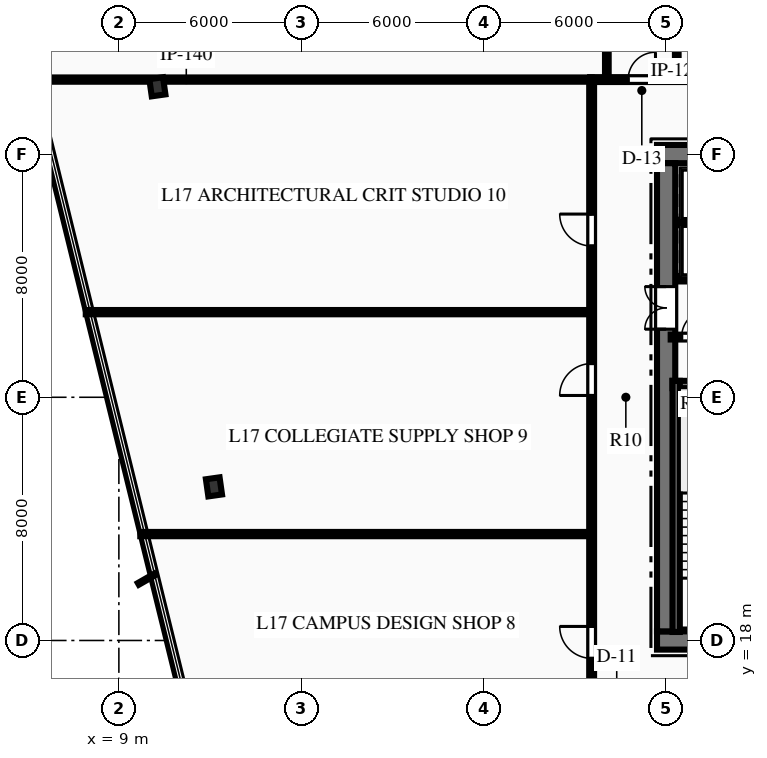
"""IFC4 building model, lengths in metres.
Left out: names, types, materials, properties, quantities, classifications, styles, units other than length and angle.
Written with IfcOpenShell. Run it as: python <this file> out.ifc"""

import sys

from ifc_helpers import new_model, si_unit, direction, frame, frame_2d, origin, origin_2d, place, context, subcontext, project, spatial, rectangle, i_section, extrude, element, fill, save


model = new_model("IFC4")
c1 = context("Model", 3, precision=1e-05, world=origin(), true_north=direction((0.0, 1.0)))
c2 = subcontext(c1, "Body", "Model", "MODEL_VIEW")
j1 = project(units=[si_unit("LENGTHUNIT", "METRE"), si_unit("PLANEANGLEUNIT", "RADIAN")], contexts=[c1])
p1 = place(None, origin())
s1 = spatial("IfcSite", under=j1, at=p1, CompositionType="ELEMENT")
p2 = place(p1, origin())
s2 = spatial("IfcBuilding", under=s1, at=p2, CompositionType="ELEMENT")
p3 = place(p2, frame((0.0, 0.0, 73.95)))
s3 = spatial("IfcBuildingStorey", under=s2, at=p3, CompositionType="ELEMENT", Elevation=73.95)
p4 = place(p3, frame((26.7, 18.0, 0.0), z_axis=(0.0, 0.0, 1.0), x_axis=(1.0, 0.0, 0.0)))
e1 = element("IfcWall", 1, at=p4, inside=s3, PredefinedType="SHEAR", context=c2, shape_type="SweptSolid", body=[
    extrude(rectangle(XDim=18.6, YDim=0.6, at=frame_2d((9.3, 0.0))), origin(), (0.0, 0.0, 1.0), 3.75),
])
p5 = place(p4, frame((7.4, 0.0, 0.0)))
e2 = element("IfcOpeningElement", 2, at=p5, cuts=e1, PredefinedType="OPENING", context=c2, shape_type="SweptSolid", body=[
    extrude(rectangle(XDim=1.1, YDim=2.15, at=frame_2d((0.55, 1.075))), frame((0.0, 0.31, 0.0), z_axis=(0.0, -1.0, 0.0), x_axis=(1.0, 0.0, 0.0)), (0.0, 0.0, 1.0), 0.62),
])
p6 = place(p4, frame((10.1, 0.0, 0.0)))
e3 = element("IfcOpeningElement", 3, at=p6, cuts=e1, PredefinedType="OPENING", context=c2, shape_type="SweptSolid", body=[
    extrude(rectangle(XDim=1.1, YDim=2.15, at=frame_2d((0.55, 1.075))), frame((0.0, 0.31, 0.0), z_axis=(0.0, -1.0, 0.0), x_axis=(1.0, 0.0, 0.0)), (0.0, 0.0, 1.0), 0.62),
])
p7 = place(p3, frame((26.7, 34.0, 0.0), z_axis=(0.0, 0.0, 1.0), x_axis=(1.0, 0.0, 0.0)))
e4 = element("IfcWall", 4, at=p7, inside=s3, PredefinedType="SHEAR", context=c2, shape_type="SweptSolid", body=[
    extrude(rectangle(XDim=18.6, YDim=0.6, at=frame_2d((9.3, 0.0))), origin(), (0.0, 0.0, 1.0), 3.75),
])
p8 = place(p7, frame((1.265, 0.0, 0.0)))
e5 = element("IfcOpeningElement", 5, at=p8, cuts=e4, PredefinedType="OPENING", context=c2, shape_type="SweptSolid", body=[
    extrude(rectangle(XDim=1.1, YDim=2.15, at=frame_2d((0.55, 1.075))), frame((0.0, 0.31, 0.0), z_axis=(0.0, -1.0, 0.0), x_axis=(1.0, 0.0, 0.0)), (0.0, 0.0, 1.0), 0.62),
])
p9 = place(p7, frame((3.515, 0.0, 0.0)))
e6 = element("IfcOpeningElement", 6, at=p9, cuts=e4, PredefinedType="OPENING", context=c2, shape_type="SweptSolid", body=[
    extrude(rectangle(XDim=1.1, YDim=2.15, at=frame_2d((0.55, 1.075))), frame((0.0, 0.31, 0.0), z_axis=(0.0, -1.0, 0.0), x_axis=(1.0, 0.0, 0.0)), (0.0, 0.0, 1.0), 0.62),
])
p10 = place(p7, frame((13.985, 0.0, 0.0)))
e7 = element("IfcOpeningElement", 7, at=p10, cuts=e4, PredefinedType="OPENING", context=c2, shape_type="SweptSolid", body=[
    extrude(rectangle(XDim=1.1, YDim=2.15, at=frame_2d((0.55, 1.075))), frame((0.0, 0.31, 0.0), z_axis=(0.0, -1.0, 0.0), x_axis=(1.0, 0.0, 0.0)), (0.0, 0.0, 1.0), 0.62),
])
p11 = place(p7, frame((16.235, 0.0, 0.0)))
e8 = element("IfcOpeningElement", 8, at=p11, cuts=e4, PredefinedType="OPENING", context=c2, shape_type="SweptSolid", body=[
    extrude(rectangle(XDim=1.1, YDim=2.15, at=frame_2d((0.55, 1.075))), frame((0.0, 0.31, 0.0), z_axis=(0.0, -1.0, 0.0), x_axis=(1.0, 0.0, 0.0)), (0.0, 0.0, 1.0), 0.62),
])
p12 = place(p3, frame((27.0, 18.3, 0.0), z_axis=(0.0, 0.0, 1.0), x_axis=(0.0, 1.0, 0.0)))
e9 = element("IfcWall", 9, at=p12, inside=s3, PredefinedType="SHEAR", context=c2, shape_type="SweptSolid", body=[
    extrude(rectangle(XDim=15.4, YDim=0.6, at=frame_2d((7.7, 0.0))), origin(), (0.0, 0.0, 1.0), 3.75),
])
p13 = place(p12, frame((9.94, 0.0, 0.0)))
e10 = element("IfcOpeningElement", 10, at=p13, cuts=e9, PredefinedType="OPENING", context=c2, shape_type="SweptSolid", body=[
    extrude(rectangle(XDim=1.4, YDim=2.2, at=frame_2d((0.7, 1.1))), frame((0.0, 0.31, 0.0), z_axis=(0.0, -1.0, 0.0), x_axis=(1.0, 0.0, 0.0)), (0.0, 0.0, 1.0), 0.62),
])
p14 = place(p3, frame((27.21, 26.42, 0.0), z_axis=(0.0, 0.0, 1.0), x_axis=(1.0, 0.0, 0.0)))
e11 = element("IfcWall", 11, at=p14, inside=s3, PredefinedType="SHEAR", context=c2, shape_type="SweptSolid", body=[
    extrude(rectangle(XDim=3.98, YDim=0.24, at=frame_2d((1.99, 0.0))), origin(), (0.0, 0.0, 1.0), 3.75),
])
p15 = place(p3, frame((27.33, 18.28, 0.0), z_axis=(0.0, 0.0, 1.0), x_axis=(0.0, 1.0, 0.0)))
e12 = element("IfcWall", 12, at=p15, inside=s3, PredefinedType="SHEAR", context=c2, shape_type="SweptSolid", body=[
    extrude(rectangle(XDim=8.26, YDim=0.24, at=frame_2d((4.13, 0.0))), origin(), (0.0, 0.0, 1.0), 3.75),
])
for number, where, z_axis, x_axis in (
    (13, (10.266, 36.213, 0.0), (0.0, 0.0, 1.0), (0.99, 0.14, 0.0)),
    (14, (12.127, 23.053, 0.0), (0.0, 0.0, 1.0), (0.99, 0.14, 0.0)),
):
    element("IfcColumn", number, at=place(p3, frame(where, z_axis=z_axis, x_axis=x_axis)), inside=s3, PredefinedType="COLUMN", context=c2, shape_type="SweptSolid", body=[
        extrude(i_section(OverallWidth=0.454, OverallDepth=0.569, WebThickness=0.078, FlangeThickness=0.125, at=origin_2d()), origin(), (0.0, 0.0, 1.0), 3.75),
    ])
p16 = place(p3, frame((27.15, 27.98, 0.0), z_axis=(0.0, 0.0, 1.0), x_axis=(1.0, 0.0, 0.0)))
e15 = element("IfcWall", 15, at=p16, inside=s3, PredefinedType="PARTITIONING", context=c2, shape_type="SweptSolid", body=[
    extrude(rectangle(XDim=4.05, YDim=0.16, at=frame_2d((2.025, 0.0))), origin(), (0.0, 0.0, 1.0), 3.44),
])
p17 = place(p16, frame((0.36, 0.0, 0.0)))
e16 = element("IfcOpeningElement", 16, at=p17, cuts=e15, PredefinedType="OPENING", context=c2, shape_type="SweptSolid", body=[
    extrude(rectangle(XDim=0.9, YDim=2.15, at=frame_2d((0.45, 1.075))), frame((0.0, 0.09, 0.0), z_axis=(0.0, -1.0, 0.0), x_axis=(1.0, 0.0, 0.0)), (0.0, 0.0, 1.0), 0.18),
])
p18 = place(p16, frame((1.63, 0.0, 0.0)))
e17 = element("IfcOpeningElement", 17, at=p18, cuts=e15, PredefinedType="OPENING", context=c2, shape_type="SweptSolid", body=[
    extrude(rectangle(XDim=0.9, YDim=2.15, at=frame_2d((0.45, 1.075))), frame((0.0, 0.09, 0.0), z_axis=(0.0, -1.0, 0.0), x_axis=(1.0, 0.0, 0.0)), (0.0, 0.0, 1.0), 0.18),
])
p19 = place(p16, frame((2.788, 0.0, 0.0)))
e18 = element("IfcOpeningElement", 18, at=p19, cuts=e15, PredefinedType="OPENING", context=c2, shape_type="SweptSolid", body=[
    extrude(rectangle(XDim=0.9, YDim=2.15, at=frame_2d((0.45, 1.075))), frame((0.0, 0.09, 0.0), z_axis=(0.0, -1.0, 0.0), x_axis=(1.0, 0.0, 0.0)), (0.0, 0.0, 1.0), 0.18),
])
p20 = place(p3, frame((27.45, 29.9, 0.0), z_axis=(0.0, 0.0, 1.0), x_axis=(1.0, 0.0, 0.0)))
e19 = element("IfcWall", 19, at=p20, inside=s3, PredefinedType="PARTITIONING", context=c2, shape_type="SweptSolid", body=[
    extrude(rectangle(XDim=4.43, YDim=0.18, at=frame_2d((2.215, 0.0))), origin(), (0.0, 0.0, 1.0), 3.44),
])
p21 = place(p20, frame((0.515, 0.0, 0.0)))
e20 = element("IfcOpeningElement", 20, at=p21, cuts=e19, PredefinedType="OPENING", context=c2, shape_type="SweptSolid", body=[
    extrude(rectangle(XDim=1.1, YDim=2.15, at=frame_2d((0.55, 1.075))), frame((0.0, 0.1, 0.0), z_axis=(0.0, -1.0, 0.0), x_axis=(1.0, 0.0, 0.0)), (0.0, 0.0, 1.0), 0.2),
])
p22 = place(p20, frame((2.765, 0.0, 0.0)))
e21 = element("IfcOpeningElement", 21, at=p22, cuts=e19, PredefinedType="OPENING", context=c2, shape_type="SweptSolid", body=[
    extrude(rectangle(XDim=1.1, YDim=2.15, at=frame_2d((0.55, 1.075))), frame((0.0, 0.1, 0.0), z_axis=(0.0, -1.0, 0.0), x_axis=(1.0, 0.0, 0.0)), (0.0, 0.0, 1.0), 0.2),
])
p23 = place(p3, frame((27.45, 31.75, 0.0), z_axis=(0.0, 0.0, 1.0), x_axis=(1.0, 0.0, 0.0)))
e22 = element("IfcWall", 22, at=p23, inside=s3, PredefinedType="PARTITIONING", context=c2, shape_type="SweptSolid", body=[
    extrude(rectangle(XDim=4.43, YDim=0.18, at=frame_2d((2.215, 0.0))), origin(), (0.0, 0.0, 1.0), 3.44),
])
p24 = place(p3, frame((24.5, 36.45, 0.0), z_axis=(0.0, 0.0, 1.0), x_axis=(1.0, 0.0, 0.0)))
e23 = element("IfcWall", 23, at=p24, inside=s3, PredefinedType="PARTITIONING", context=c2, shape_type="SweptSolid", body=[
    extrude(rectangle(XDim=23.0, YDim=0.16, at=frame_2d((11.5, 0.0))), origin(), (0.0, 0.0, 1.0), 3.44),
])
p25 = place(p24, frame((1.25, 0.0, 0.0)))
e24 = element("IfcOpeningElement", 24, at=p25, cuts=e23, PredefinedType="OPENING", context=c2, shape_type="SweptSolid", body=[
    extrude(rectangle(XDim=0.9, YDim=2.15, at=frame_2d((0.45, 1.075))), frame((0.0, 0.09, 0.0), z_axis=(0.0, -1.0, 0.0), x_axis=(1.0, 0.0, 0.0)), (0.0, 0.0, 1.0), 0.18),
])
p26 = place(p24, frame((3.55, 0.0, 0.0)))
e25 = element("IfcOpeningElement", 25, at=p26, cuts=e23, PredefinedType="OPENING", context=c2, shape_type="SweptSolid", body=[
    extrude(rectangle(XDim=0.9, YDim=2.15, at=frame_2d((0.45, 1.075))), frame((0.0, 0.09, 0.0), z_axis=(0.0, -1.0, 0.0), x_axis=(1.0, 0.0, 0.0)), (0.0, 0.0, 1.0), 0.18),
])
p27 = place(p24, frame((5.8, 0.0, 0.0)))
e26 = element("IfcOpeningElement", 26, at=p27, cuts=e23, PredefinedType="OPENING", context=c2, shape_type="SweptSolid", body=[
    extrude(rectangle(XDim=1.0, YDim=2.15, at=frame_2d((0.5, 1.075))), frame((0.0, 0.09, 0.0), z_axis=(0.0, -1.0, 0.0), x_axis=(1.0, 0.0, 0.0)), (0.0, 0.0, 1.0), 0.18),
])
p28 = place(p24, frame((9.465, 0.0, 0.0)))
e27 = element("IfcOpeningElement", 27, at=p28, cuts=e23, PredefinedType="OPENING", context=c2, shape_type="SweptSolid", body=[
    extrude(rectangle(XDim=1.05, YDim=2.15, at=frame_2d((0.525, 1.075))), frame((0.0, 0.09, 0.0), z_axis=(0.0, -1.0, 0.0), x_axis=(1.0, 0.0, 0.0)), (0.0, 0.0, 1.0), 0.18),
])
p29 = place(p24, frame((16.755, 0.0, 0.0)))
e28 = element("IfcOpeningElement", 28, at=p29, cuts=e23, PredefinedType="OPENING", context=c2, shape_type="SweptSolid", body=[
    extrude(rectangle(XDim=1.05, YDim=2.15, at=frame_2d((0.525, 1.075))), frame((0.0, 0.09, 0.0), z_axis=(0.0, -1.0, 0.0), x_axis=(1.0, 0.0, 0.0)), (0.0, 0.0, 1.0), 0.18),
])
p30 = place(p24, frame((21.28, 0.0, 0.0)))
e29 = element("IfcOpeningElement", 29, at=p30, cuts=e23, PredefinedType="OPENING", context=c2, shape_type="SweptSolid", body=[
    extrude(rectangle(XDim=1.05, YDim=2.15, at=frame_2d((0.525, 1.075))), frame((0.0, 0.09, 0.0), z_axis=(0.0, -1.0, 0.0), x_axis=(1.0, 0.0, 0.0)), (0.0, 0.0, 1.0), 0.18),
])
p31 = place(p3, frame((24.55, 15.55, 0.0), z_axis=(0.0, 0.0, 1.0), x_axis=(0.0, 1.0, 0.0)))
e30 = element("IfcWall", 30, at=p31, inside=s3, PredefinedType="PARTITIONING", context=c2, shape_type="SweptSolid", body=[
    extrude(rectangle(XDim=20.9, YDim=0.16, at=frame_2d((10.45, 0.0))), origin(), (0.0, 0.0, 1.0), 3.44),
])
p32 = place(p31, frame((1.862, 0.0, 0.0)))
e31 = element("IfcOpeningElement", 31, at=p32, cuts=e30, PredefinedType="OPENING", context=c2, shape_type="SweptSolid", body=[
    extrude(rectangle(XDim=1.05, YDim=2.15, at=frame_2d((0.525, 1.075))), frame((0.0, 0.09, 0.0), z_axis=(0.0, -1.0, 0.0), x_axis=(1.0, 0.0, 0.0)), (0.0, 0.0, 1.0), 0.18),
])
p33 = place(p31, frame((10.509, 0.0, 0.0)))
e32 = element("IfcOpeningElement", 32, at=p33, cuts=e30, PredefinedType="OPENING", context=c2, shape_type="SweptSolid", body=[
    extrude(rectangle(XDim=1.05, YDim=2.15, at=frame_2d((0.525, 1.075))), frame((0.0, 0.09, 0.0), z_axis=(0.0, -1.0, 0.0), x_axis=(1.0, 0.0, 0.0)), (0.0, 0.0, 1.0), 0.18),
])
p34 = place(p31, frame((15.426, 0.0, 0.0)))
e33 = element("IfcOpeningElement", 33, at=p34, cuts=e30, PredefinedType="OPENING", context=c2, shape_type="SweptSolid", body=[
    extrude(rectangle(XDim=1.05, YDim=2.15, at=frame_2d((0.525, 1.075))), frame((0.0, 0.09, 0.0), z_axis=(0.0, -1.0, 0.0), x_axis=(1.0, 0.0, 0.0)), (0.0, 0.0, 1.0), 0.18),
])
for number, where, z_axis, x_axis in (
    (34, (25.05, 36.45, 0.0), (0.0, 0.0, 1.0), (0.0, 1.0, 0.0)),
    (35, (27.35, 36.45, 0.0), (0.0, 0.0, 1.0), (0.0, 1.0, 0.0)),
):
    element("IfcWall", number, at=place(p3, frame(where, z_axis=z_axis, x_axis=x_axis)), inside=s3, PredefinedType="PARTITIONING", context=c2, shape_type="SweptSolid", body=[
        extrude(rectangle(XDim=3.9, YDim=0.12, at=frame_2d((1.95, 0.0))), origin(), (0.0, 0.0, 1.0), 3.44),
    ])
p35 = place(p3, frame((6.032, 36.45, 0.0), z_axis=(0.0, 0.0, 1.0), x_axis=(1.0, 0.0, 0.0)))
e36 = element("IfcWall", 36, at=p35, inside=s3, PredefinedType="PARTITIONING", context=c2, shape_type="SweptSolid", body=[
    extrude(rectangle(XDim=18.518, YDim=0.14, at=frame_2d((9.259, 0.0))), origin(), (0.0, 0.0, 1.0), 2.972),
])
p36 = place(p3, frame((9.704, 21.5, 0.0), z_axis=(0.0, 0.0, 1.0), x_axis=(1.0, 0.0, 0.0)))
e37 = element("IfcWall", 37, at=p36, inside=s3, PredefinedType="PARTITIONING", context=c2, shape_type="SweptSolid", body=[
    extrude(rectangle(XDim=14.846, YDim=0.14, at=frame_2d((7.423, 0.0))), origin(), (0.0, 0.0, 1.0), 3.44),
])
p37 = place(p3, frame((7.911, 28.8, 0.0), z_axis=(0.0, 0.0, 1.0), x_axis=(1.0, 0.0, 0.0)))
e38 = element("IfcWall", 38, at=p37, inside=s3, PredefinedType="PARTITIONING", context=c2, shape_type="SweptSolid", body=[
    extrude(rectangle(XDim=16.639, YDim=0.14, at=frame_2d((8.319, 0.0))), origin(), (0.0, 0.0, 1.0), 3.44),
])
p38 = place(p17, origin())
e39 = element("IfcDoor", 39, at=p38, inside=s3, OperationType="SINGLE_SWING_RIGHT", PredefinedType="DOOR", context=c2, shape_type="SweptSolid", body=[
    extrude(rectangle(XDim=0.9, YDim=2.15, at=frame_2d((0.45, 1.075))), frame((0.0, 0.025, 0.0), z_axis=(0.0, -1.0, 0.0), x_axis=(1.0, 0.0, 0.0)), (0.0, 0.0, 1.0), 0.05),
])
fill(e16, e39)
p39 = place(p13, origin())
e40 = element("IfcDoor", 40, at=p39, inside=s3, OperationType="DOUBLE_DOOR_SINGLE_SWING", PredefinedType="DOOR", context=c2, shape_type="SweptSolid", body=[
    extrude(rectangle(XDim=1.4, YDim=2.2, at=frame_2d((0.7, 1.1))), frame((0.0, 0.025, 0.0), z_axis=(0.0, -1.0, 0.0), x_axis=(1.0, 0.0, 0.0)), (0.0, 0.0, 1.0), 0.05),
])
fill(e10, e40)
p40 = place(p25, origin())
e41 = element("IfcDoor", 41, at=p40, inside=s3, OperationType="SINGLE_SWING_RIGHT", PredefinedType="DOOR", context=c2, shape_type="SweptSolid", body=[
    extrude(rectangle(XDim=0.9, YDim=2.15, at=frame_2d((0.45, 1.075))), frame((0.0, 0.025, 0.0), z_axis=(0.0, -1.0, 0.0), x_axis=(1.0, 0.0, 0.0)), (0.0, 0.0, 1.0), 0.05),
])
fill(e24, e41)
p41 = place(p32, origin())
e42 = element("IfcDoor", 42, at=p41, inside=s3, OperationType="SINGLE_SWING_RIGHT", PredefinedType="DOOR", context=c2, shape_type="SweptSolid", body=[
    extrude(rectangle(XDim=1.05, YDim=2.15, at=frame_2d((0.525, 1.075))), frame((0.0, 0.025, 0.0), z_axis=(0.0, -1.0, 0.0), x_axis=(1.0, 0.0, 0.0)), (0.0, 0.0, 1.0), 0.05),
])
fill(e31, e42)
p42 = place(p33, origin())
e43 = element("IfcDoor", 43, at=p42, inside=s3, OperationType="SINGLE_SWING_LEFT", PredefinedType="DOOR", context=c2, shape_type="SweptSolid", body=[
    extrude(rectangle(XDim=1.05, YDim=2.15, at=frame_2d((0.525, 1.075))), frame((0.0, 0.025, 0.0), z_axis=(0.0, -1.0, 0.0), x_axis=(1.0, 0.0, 0.0)), (0.0, 0.0, 1.0), 0.05),
])
fill(e32, e43)
p43 = place(p34, origin())
e44 = element("IfcDoor", 44, at=p43, inside=s3, OperationType="SINGLE_SWING_RIGHT", PredefinedType="DOOR", context=c2, shape_type="SweptSolid", body=[
    extrude(rectangle(XDim=1.05, YDim=2.15, at=frame_2d((0.525, 1.075))), frame((0.0, 0.025, 0.0), z_axis=(0.0, -1.0, 0.0), x_axis=(1.0, 0.0, 0.0)), (0.0, 0.0, 1.0), 0.05),
])
fill(e33, e44)
save(model, sys.argv[1])
